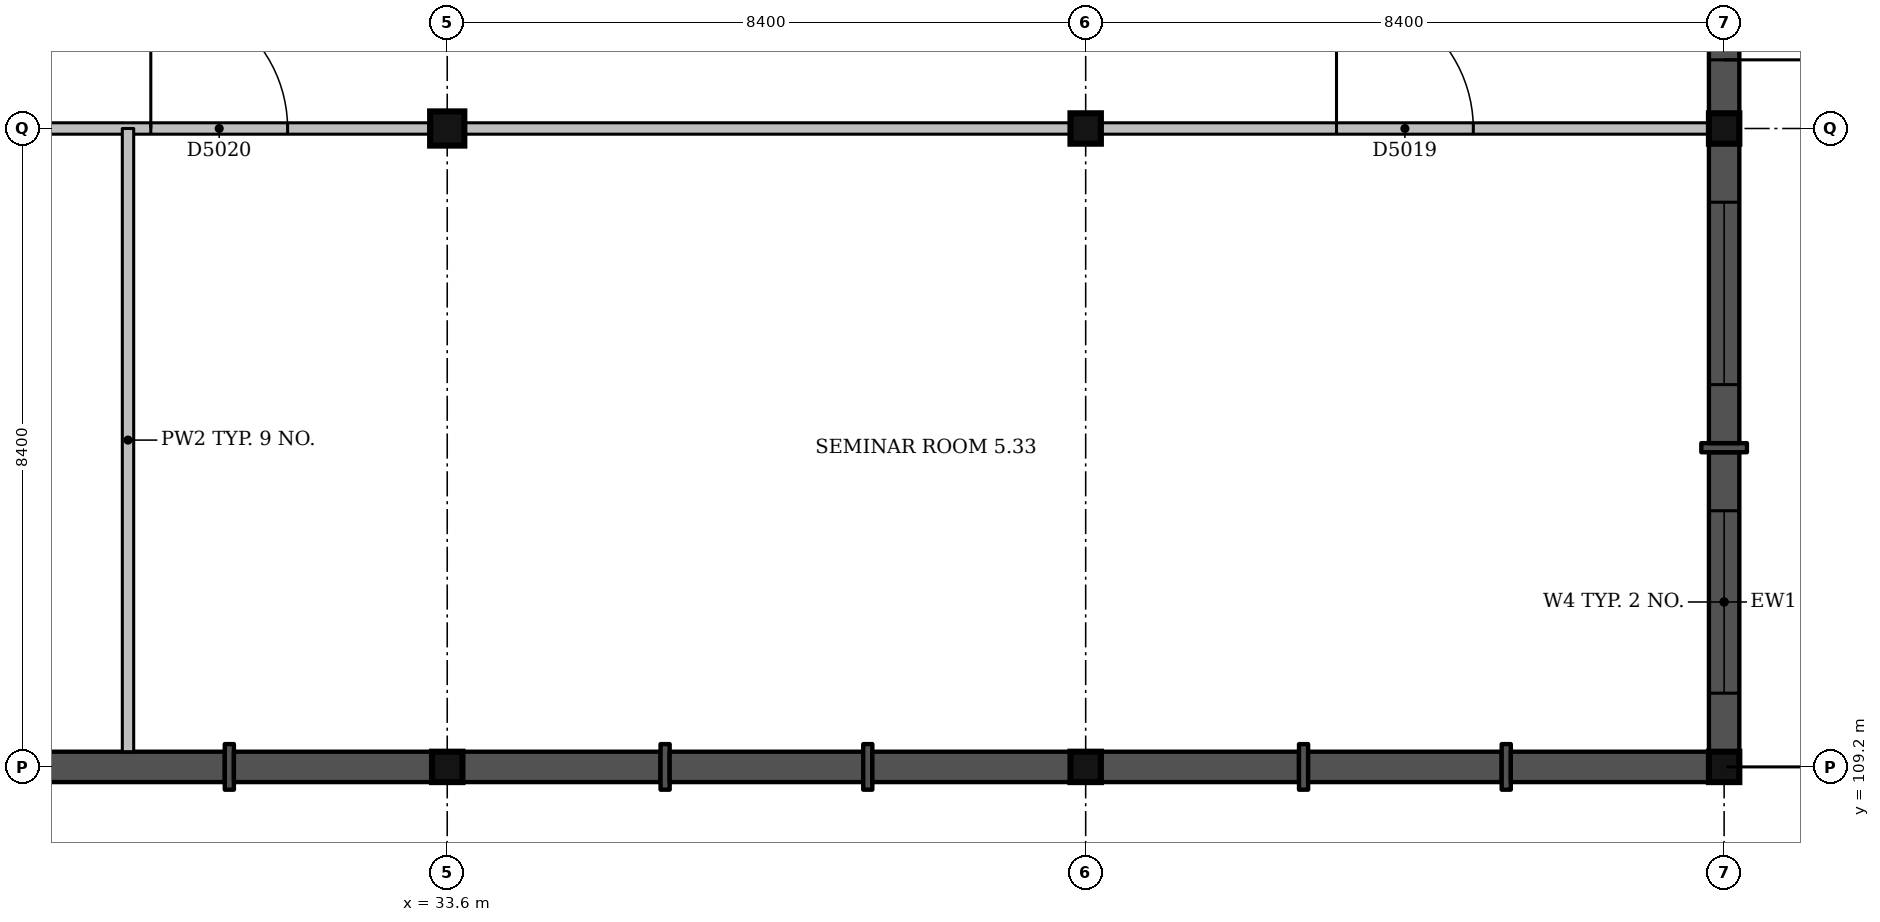
"""IFC4 building model, lengths in metres.
Left out: names, types, materials, properties, quantities, classifications, styles, units other than length and angle.
Written with IfcOpenShell. Run it as: python <this file> out.ifc"""

import sys

from ifc_helpers import new_model, si_unit, direction, frame, frame_2d, origin, origin_2d, place, context, subcontext, project, spatial, rectangle, extrude, element, fill, save


model = new_model("IFC4")
c1 = context("Model", 3, precision=1e-05, world=origin(), true_north=direction((0.0, 1.0)))
c2 = subcontext(c1, "Body", "Model", "MODEL_VIEW")
j1 = project(units=[si_unit("LENGTHUNIT", "METRE"), si_unit("PLANEANGLEUNIT", "RADIAN")], contexts=[c1])
p1 = place(None, origin())
s1 = spatial("IfcSite", under=j1, at=p1, CompositionType="ELEMENT")
p2 = place(p1, origin())
s2 = spatial("IfcBuilding", under=s1, at=p2, CompositionType="ELEMENT")
p3 = place(p2, frame((0.0, 0.0, 22.5)))
s3 = spatial("IfcBuildingStorey", under=s2, at=p3, CompositionType="ELEMENT", Elevation=22.5)
p4 = place(p3, frame((33.6, 109.2, 0.0), z_axis=(0.0, 0.0, 1.0), x_axis=(1.0, 0.0, 0.0)))
e1 = element("IfcColumn", 1, at=p4, inside=s3, PredefinedType="COLUMN", context=c2, shape_type="SweptSolid", body=[
    extrude(rectangle(XDim=0.4, YDim=0.4, at=origin_2d()), origin(), (0.0, 0.0, 1.0), 4.5),
])
p5 = place(p3, frame((33.6, 117.6, 0.0), z_axis=(0.0, 0.0, 1.0), x_axis=(1.0, 0.0, 0.0)))
e2 = element("IfcColumn", 2, at=p5, inside=s3, PredefinedType="COLUMN", context=c2, shape_type="SweptSolid", body=[
    extrude(rectangle(XDim=0.45, YDim=0.45, at=origin_2d()), origin(), (0.0, 0.0, 1.0), 4.5),
])
for number, where, z_axis, x_axis in (
    (3, (42.0, 109.2, 0.0), (0.0, 0.0, 1.0), (1.0, 0.0, 0.0)),
    (4, (42.0, 117.6, 0.0), (0.0, 0.0, 1.0), (1.0, 0.0, 0.0)),
    (5, (50.4, 109.2, 0.0), (0.0, 0.0, 1.0), (1.0, 0.0, 0.0)),
    (6, (50.4, 117.6, 0.0), (0.0, 0.0, 1.0), (1.0, 0.0, 0.0)),
):
    element("IfcColumn", number, at=place(p3, frame(where, z_axis=z_axis, x_axis=x_axis)), inside=s3, PredefinedType="COLUMN", context=c2, shape_type="SweptSolid", body=[
        extrude(rectangle(XDim=0.4, YDim=0.4, at=origin_2d()), origin(), (0.0, 0.0, 1.0), 4.5),
    ])
p6 = place(p3, frame((50.4, 109.4, 0.0), z_axis=(0.0, 0.0, 1.0), x_axis=(0.0, 1.0, 0.0)))
e7 = element("IfcWall", 7, at=p6, inside=s3, PredefinedType="SOLIDWALL", context=c2, shape_type="SweptSolid", body=[
    extrude(rectangle(XDim=3.94, YDim=0.4, at=frame_2d((1.97, 0.0))), origin(), (0.0, 0.0, 1.0), 3.35),
])
p7 = place(p6, frame((0.77, 0.0, 0.6)))
e8 = element("IfcOpeningElement", 8, at=p7, cuts=e7, PredefinedType="OPENING", context=c2, shape_type="SweptSolid", body=[
    extrude(rectangle(XDim=2.4, YDim=2.4, at=frame_2d((1.2, 1.2))), frame((0.0, 0.21, 0.0), z_axis=(0.0, -1.0, 0.0), x_axis=(1.0, 0.0, 0.0)), (0.0, 0.0, 1.0), 0.42),
])
p8 = place(p3, frame((50.4, 113.34, 0.0), z_axis=(0.0, 0.0, 1.0), x_axis=(0.0, 1.0, 0.0)))
e9 = element("IfcWall", 9, at=p8, inside=s3, PredefinedType="SOLIDWALL", context=c2, shape_type="SweptSolid", body=[
    extrude(rectangle(XDim=0.12, YDim=0.6, at=frame_2d((0.06, 0.0))), origin(), (0.0, 0.0, 1.0), 3.35),
])
p9 = place(p3, frame((50.4, 113.46, 0.0), z_axis=(0.0, 0.0, 1.0), x_axis=(0.0, 1.0, 0.0)))
e10 = element("IfcWall", 10, at=p9, inside=s3, PredefinedType="SOLIDWALL", context=c2, shape_type="SweptSolid", body=[
    extrude(rectangle(XDim=3.94, YDim=0.4, at=frame_2d((1.97, 0.0))), origin(), (0.0, 0.0, 1.0), 3.35),
])
p10 = place(p9, frame((0.77, 0.0, 0.6)))
e11 = element("IfcOpeningElement", 11, at=p10, cuts=e10, PredefinedType="OPENING", context=c2, shape_type="SweptSolid", body=[
    extrude(rectangle(XDim=2.4, YDim=2.4, at=frame_2d((1.2, 1.2))), frame((0.0, 0.21, 0.0), z_axis=(0.0, -1.0, 0.0), x_axis=(1.0, 0.0, 0.0)), (0.0, 0.0, 1.0), 0.42),
])
p11 = place(p3, frame((50.4, 117.8, 0.0), z_axis=(0.0, 0.0, 1.0), x_axis=(0.0, 1.0, 0.0)))
e12 = element("IfcWall", 12, at=p11, inside=s3, PredefinedType="SOLIDWALL", context=c2, shape_type="SweptSolid", body=[
    extrude(rectangle(XDim=2.607, YDim=0.4, at=frame_2d((1.303, 0.0))), origin(), (0.0, 0.0, 1.0), 3.35),
])
p12 = place(p11, frame((0.703, 0.0, 0.0)))
e13 = element("IfcOpeningElement", 13, at=p12, cuts=e12, PredefinedType="OPENING", context=c2, shape_type="SweptSolid", body=[
    extrude(rectangle(XDim=1.2, YDim=2.1, at=frame_2d((0.6, 1.05))), frame((0.0, 0.21, 0.0), z_axis=(0.0, -1.0, 0.0), x_axis=(1.0, 0.0, 0.0)), (0.0, 0.0, 1.0), 0.42),
])
p13 = place(p3, frame((28.127, 109.2, 0.0), z_axis=(0.0, 0.0, 1.0), x_axis=(1.0, 0.0, 0.0)))
e14 = element("IfcWall", 14, at=p13, inside=s3, PredefinedType="SOLIDWALL", context=c2, shape_type="SweptSolid", body=[
    extrude(rectangle(XDim=2.547, YDim=0.4, at=frame_2d((1.273, 0.0))), origin(), (0.0, 0.0, 1.0), 4.2),
])
p14 = place(p3, frame((30.673, 109.2, 0.0), z_axis=(0.0, 0.0, 1.0), x_axis=(1.0, 0.0, 0.0)))
e15 = element("IfcWall", 15, at=p14, inside=s3, PredefinedType="SOLIDWALL", context=c2, shape_type="SweptSolid", body=[
    extrude(rectangle(XDim=0.12, YDim=0.6, at=frame_2d((0.06, 0.0))), origin(), (0.0, 0.0, 1.0), 4.2),
])
p15 = place(p3, frame((30.793, 109.2, 0.0), z_axis=(0.0, 0.0, 1.0), x_axis=(1.0, 0.0, 0.0)))
e16 = element("IfcWall", 16, at=p15, inside=s3, PredefinedType="SOLIDWALL", context=c2, shape_type="SweptSolid", body=[
    extrude(rectangle(XDim=2.607, YDim=0.4, at=frame_2d((1.303, 0.0))), origin(), (0.0, 0.0, 1.0), 4.2),
])
p16 = place(p3, frame((33.8, 109.2, 0.0), z_axis=(0.0, 0.0, 1.0), x_axis=(1.0, 0.0, 0.0)))
e17 = element("IfcWall", 17, at=p16, inside=s3, PredefinedType="SOLIDWALL", context=c2, shape_type="SweptSolid", body=[
    extrude(rectangle(XDim=2.607, YDim=0.4, at=frame_2d((1.303, 0.0))), origin(), (0.0, 0.0, 1.0), 3.35),
])
p17 = place(p3, frame((36.407, 109.2, 0.0), z_axis=(0.0, 0.0, 1.0), x_axis=(1.0, 0.0, 0.0)))
e18 = element("IfcWall", 18, at=p17, inside=s3, PredefinedType="SOLIDWALL", context=c2, shape_type="SweptSolid", body=[
    extrude(rectangle(XDim=0.12, YDim=0.6, at=frame_2d((0.06, 0.0))), origin(), (0.0, 0.0, 1.0), 3.35),
])
p18 = place(p3, frame((36.527, 109.2, 0.0), z_axis=(0.0, 0.0, 1.0), x_axis=(1.0, 0.0, 0.0)))
e19 = element("IfcWall", 19, at=p18, inside=s3, PredefinedType="SOLIDWALL", context=c2, shape_type="SweptSolid", body=[
    extrude(rectangle(XDim=2.547, YDim=0.4, at=frame_2d((1.273, 0.0))), origin(), (0.0, 0.0, 1.0), 3.35),
])
p19 = place(p3, frame((39.073, 109.2, 0.0), z_axis=(0.0, 0.0, 1.0), x_axis=(1.0, 0.0, 0.0)))
e20 = element("IfcWall", 20, at=p19, inside=s3, PredefinedType="SOLIDWALL", context=c2, shape_type="SweptSolid", body=[
    extrude(rectangle(XDim=0.12, YDim=0.6, at=frame_2d((0.06, 0.0))), origin(), (0.0, 0.0, 1.0), 3.35),
])
for number, where, z_axis, x_axis in (
    (21, (39.193, 109.2, 0.0), (0.0, 0.0, 1.0), (1.0, 0.0, 0.0)),
    (22, (42.2, 109.2, 0.0), (0.0, 0.0, 1.0), (1.0, 0.0, 0.0)),
):
    element("IfcWall", number, at=place(p3, frame(where, z_axis=z_axis, x_axis=x_axis)), inside=s3, PredefinedType="SOLIDWALL", context=c2, shape_type="SweptSolid", body=[
        extrude(rectangle(XDim=2.607, YDim=0.4, at=frame_2d((1.303, 0.0))), origin(), (0.0, 0.0, 1.0), 3.35),
    ])
p20 = place(p3, frame((44.807, 109.2, 0.0), z_axis=(0.0, 0.0, 1.0), x_axis=(1.0, 0.0, 0.0)))
e23 = element("IfcWall", 23, at=p20, inside=s3, PredefinedType="SOLIDWALL", context=c2, shape_type="SweptSolid", body=[
    extrude(rectangle(XDim=0.12, YDim=0.6, at=frame_2d((0.06, 0.0))), origin(), (0.0, 0.0, 1.0), 3.35),
])
p21 = place(p3, frame((44.927, 109.2, 0.0), z_axis=(0.0, 0.0, 1.0), x_axis=(1.0, 0.0, 0.0)))
e24 = element("IfcWall", 24, at=p21, inside=s3, PredefinedType="SOLIDWALL", context=c2, shape_type="SweptSolid", body=[
    extrude(rectangle(XDim=2.547, YDim=0.4, at=frame_2d((1.273, 0.0))), origin(), (0.0, 0.0, 1.0), 3.35),
])
p22 = place(p3, frame((47.473, 109.2, 0.0), z_axis=(0.0, 0.0, 1.0), x_axis=(1.0, 0.0, 0.0)))
e25 = element("IfcWall", 25, at=p22, inside=s3, PredefinedType="SOLIDWALL", context=c2, shape_type="SweptSolid", body=[
    extrude(rectangle(XDim=0.12, YDim=0.6, at=frame_2d((0.06, 0.0))), origin(), (0.0, 0.0, 1.0), 3.35),
])
p23 = place(p3, frame((47.593, 109.2, 0.0), z_axis=(0.0, 0.0, 1.0), x_axis=(1.0, 0.0, 0.0)))
e26 = element("IfcWall", 26, at=p23, inside=s3, PredefinedType="SOLIDWALL", context=c2, shape_type="SweptSolid", body=[
    extrude(rectangle(XDim=2.607, YDim=0.4, at=frame_2d((1.303, 0.0))), origin(), (0.0, 0.0, 1.0), 3.35),
])
p24 = place(p3, frame((25.425, 117.6, 0.0), z_axis=(0.0, 0.0, 1.0), x_axis=(1.0, 0.0, 0.0)))
e27 = element("IfcWall", 27, at=p24, inside=s3, PredefinedType="PARTITIONING", context=c2, shape_type="SweptSolid", body=[
    extrude(rectangle(XDim=7.95, YDim=0.15, at=frame_2d((3.975, 0.0))), origin(), (0.0, 0.0, 1.0), 3.4),
])
p25 = place(p24, frame((4.275, 0.0, 0.0)))
e28 = element("IfcOpeningElement", 28, at=p25, cuts=e27, PredefinedType="OPENING", context=c2, shape_type="SweptSolid", body=[
    extrude(rectangle(XDim=1.8, YDim=2.1, at=frame_2d((0.9, 1.05))), frame((0.0, 0.085, 0.0), z_axis=(0.0, -1.0, 0.0), x_axis=(1.0, 0.0, 0.0)), (0.0, 0.0, 1.0), 0.17),
])
p26 = place(p3, frame((33.825, 117.6, 0.0), z_axis=(0.0, 0.0, 1.0), x_axis=(1.0, 0.0, 0.0)))
e29 = element("IfcWall", 29, at=p26, inside=s3, PredefinedType="PARTITIONING", context=c2, shape_type="SweptSolid", body=[
    extrude(rectangle(XDim=7.975, YDim=0.15, at=frame_2d((3.988, 0.0))), origin(), (0.0, 0.0, 1.0), 3.4),
])
p27 = place(p3, frame((42.2, 117.6, 0.0), z_axis=(0.0, 0.0, 1.0), x_axis=(1.0, 0.0, 0.0)))
e30 = element("IfcWall", 30, at=p27, inside=s3, PredefinedType="PARTITIONING", context=c2, shape_type="SweptSolid", body=[
    extrude(rectangle(XDim=8.0, YDim=0.15, at=frame_2d((4.0, 0.0))), origin(), (0.0, 0.0, 1.0), 3.35),
])
p28 = place(p27, frame((3.1, 0.0, 0.0)))
e31 = element("IfcOpeningElement", 31, at=p28, cuts=e30, PredefinedType="OPENING", context=c2, shape_type="SweptSolid", body=[
    extrude(rectangle(XDim=1.8, YDim=2.1, at=frame_2d((0.9, 1.05))), frame((0.0, 0.085, 0.0), z_axis=(0.0, -1.0, 0.0), x_axis=(1.0, 0.0, 0.0)), (0.0, 0.0, 1.0), 0.17),
])
p29 = place(p3, frame((29.4, 109.4, 0.0), z_axis=(0.0, 0.0, 1.0), x_axis=(0.0, 1.0, 0.0)))
e32 = element("IfcWall", 32, at=p29, inside=s3, PredefinedType="PARTITIONING", context=c2, shape_type="SweptSolid", body=[
    extrude(rectangle(XDim=8.2, YDim=0.15, at=frame_2d((4.1, 0.0))), origin(), (0.0, 0.0, 1.0), 3.4),
])
p30 = place(p7, origin())
e33 = element("IfcWindow", 33, at=p30, inside=s3, PartitioningType="SINGLE_PANEL", PredefinedType="WINDOW", context=c2, shape_type="SweptSolid", body=[
    extrude(rectangle(XDim=2.4, YDim=2.4, at=frame_2d((1.2, 1.2))), frame((0.0, 0.16, 0.0), z_axis=(0.0, -1.0, 0.0), x_axis=(1.0, 0.0, 0.0)), (0.0, 0.0, 1.0), 0.06),
])
fill(e8, e33)
p31 = place(p10, origin())
e34 = element("IfcWindow", 34, at=p31, inside=s3, PartitioningType="SINGLE_PANEL", PredefinedType="WINDOW", context=c2, shape_type="SweptSolid", body=[
    extrude(rectangle(XDim=2.4, YDim=2.4, at=frame_2d((1.2, 1.2))), frame((0.0, 0.16, 0.0), z_axis=(0.0, -1.0, 0.0), x_axis=(1.0, 0.0, 0.0)), (0.0, 0.0, 1.0), 0.06),
])
fill(e11, e34)
p32 = place(p12, origin())
e35 = element("IfcDoor", 35, at=p32, inside=s3, OperationType="SINGLE_SWING_LEFT", PredefinedType="DOOR", context=c2, shape_type="SweptSolid", body=[
    extrude(rectangle(XDim=1.2, YDim=2.1, at=frame_2d((0.6, 1.05))), frame((0.0, 0.025, 0.0), z_axis=(0.0, -1.0, 0.0), x_axis=(1.0, 0.0, 0.0)), (0.0, 0.0, 1.0), 0.05),
])
fill(e13, e35)
p33 = place(p28, origin())
e36 = element("IfcDoor", 36, at=p33, inside=s3, OperationType="DOUBLE_DOOR_SINGLE_SWING", PredefinedType="DOOR", context=c2, shape_type="SweptSolid", body=[
    extrude(rectangle(XDim=1.8, YDim=2.1, at=frame_2d((0.9, 1.05))), frame((0.0, 0.025, 0.0), z_axis=(0.0, -1.0, 0.0), x_axis=(1.0, 0.0, 0.0)), (0.0, 0.0, 1.0), 0.05),
])
fill(e31, e36)
p34 = place(p25, origin())
e37 = element("IfcDoor", 37, at=p34, inside=s3, OperationType="DOUBLE_DOOR_SINGLE_SWING", PredefinedType="DOOR", context=c2, shape_type="SweptSolid", body=[
    extrude(rectangle(XDim=1.8, YDim=2.1, at=frame_2d((0.9, 1.05))), frame((0.0, 0.025, 0.0), z_axis=(0.0, -1.0, 0.0), x_axis=(1.0, 0.0, 0.0)), (0.0, 0.0, 1.0), 0.05),
])
fill(e28, e37)
save(model, sys.argv[1])
